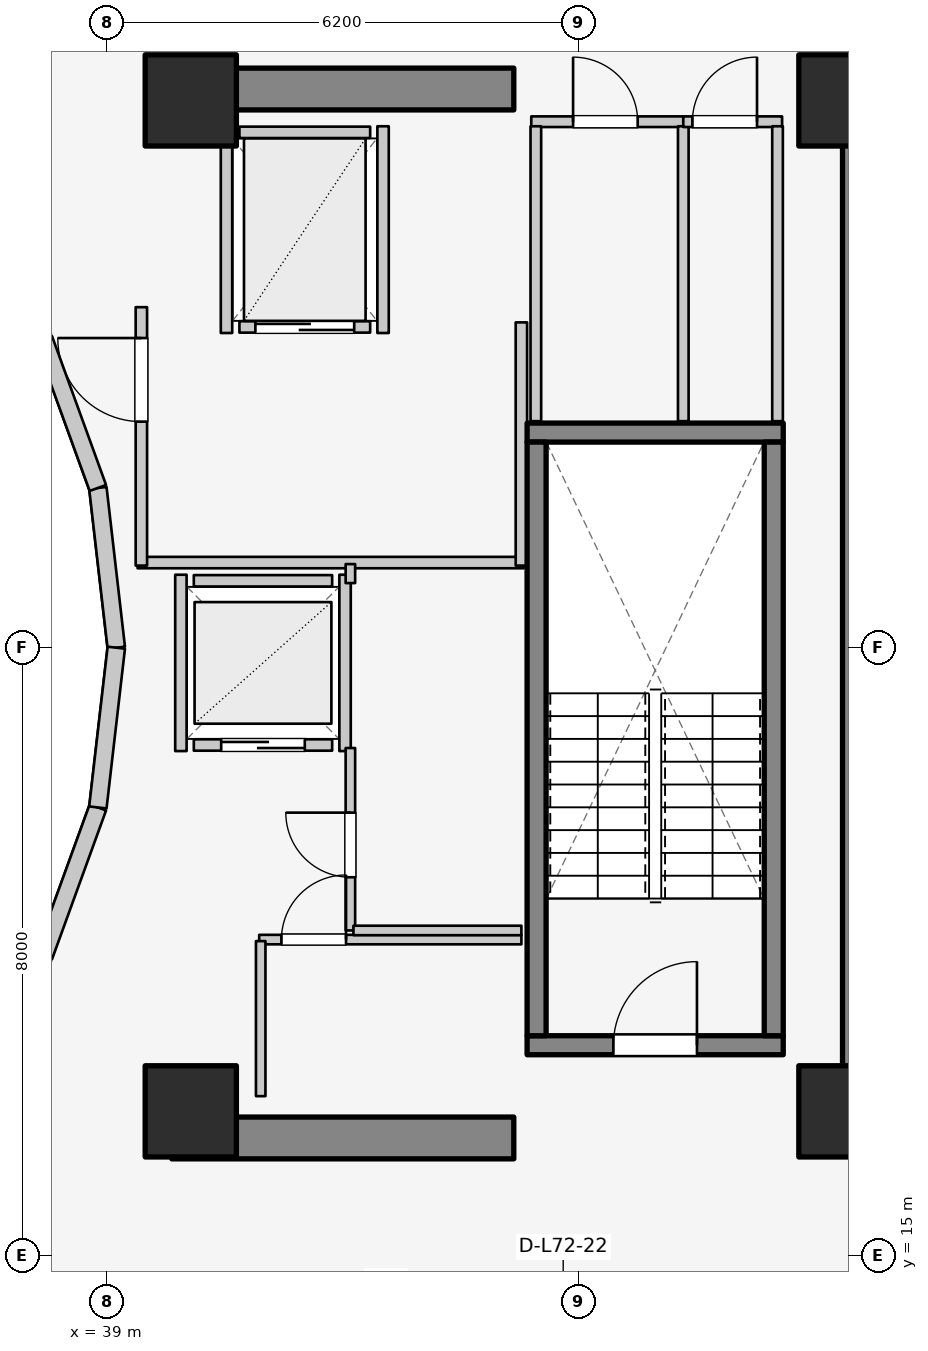
"""IFC4 building model, lengths in metres.
Left out: names, types, materials, properties, quantities, classifications, styles, units other than length and angle.
Written with IfcOpenShell. Run it as: python <this file> out.ifc"""

import sys

from ifc_helpers import new_model, si_unit, direction, frame, frame_2d, origin, origin_2d, place, context, subcontext, project, spatial, rectangle, extrude, element, fill, save


model = new_model("IFC4")
c1 = context("Model", 3, precision=1e-05, world=origin(), true_north=direction((0.0, 1.0)))
c2 = subcontext(c1, "Body", "Model", "MODEL_VIEW")
j1 = project(units=[si_unit("LENGTHUNIT", "METRE"), si_unit("PLANEANGLEUNIT", "RADIAN")], contexts=[c1])
p1 = place(None, origin())
s1 = spatial("IfcSite", under=j1, at=p1, CompositionType="ELEMENT")
p2 = place(p1, origin())
s2 = spatial("IfcBuilding", under=s1, at=p2, CompositionType="ELEMENT")
p3 = place(p2, frame((0.0, 0.0, 235.7)))
s3 = spatial("IfcBuildingStorey", under=s2, at=p3, CompositionType="ELEMENT", Elevation=235.7)
p4 = place(p3, frame((48.95, 17.05, 0.0), z_axis=(0.0, 0.0, 1.0), x_axis=(0.0, 1.0, 0.0)))
e1 = element("IfcWall", 1, at=p4, inside=s3, PredefinedType="SHEAR", context=c2, shape_type="SweptSolid", body=[
    extrude(rectangle(XDim=12.8, YDim=0.55, at=frame_2d((6.4, 0.0))), origin(), (0.0, 0.0, 1.0), 3.1),
])
for number, where, z_axis, x_axis in (
    (2, (39.85, 16.55, 0.0), (0.0, 0.0, 1.0), (1.0, 0.0, 0.0)),
    (3, (39.85, 30.35, 0.0), (0.0, 0.0, 1.0), (1.0, 0.0, 0.0)),
):
    element("IfcWall", number, at=place(p3, frame(where, z_axis=z_axis, x_axis=x_axis)), inside=s3, PredefinedType="SHEAR", context=c2, shape_type="SweptSolid", body=[
        extrude(rectangle(XDim=4.5, YDim=0.55, at=frame_2d((2.25, 0.0))), origin(), (0.0, 0.0, 1.0), 3.1),
    ])
p5 = place(p3, frame((44.525, 17.77, 0.0), z_axis=(0.0, 0.0, 1.0), x_axis=(1.0, 0.0, 0.0)))
e4 = element("IfcWall", 4, at=p5, inside=s3, PredefinedType="SOLIDWALL", context=c2, shape_type="SweptSolid", body=[
    extrude(rectangle(XDim=3.37, YDim=0.25, at=frame_2d((1.685, 0.0))), origin(), (0.0, 0.0, 1.0), 3.1),
])
p6 = place(p5, frame((1.135, 0.0, 0.0)))
e5 = element("IfcOpeningElement", 5, at=p6, cuts=e4, PredefinedType="OPENING", context=c2, shape_type="SweptSolid", body=[
    extrude(rectangle(XDim=1.1, YDim=2.1, at=frame_2d((0.55, 1.05))), frame((0.0, 0.135, 0.0), z_axis=(0.0, -1.0, 0.0), x_axis=(1.0, 0.0, 0.0)), (0.0, 0.0, 1.0), 0.27),
])
p7 = place(p3, frame((44.525, 25.83, 0.0), z_axis=(0.0, 0.0, 1.0), x_axis=(1.0, 0.0, 0.0)))
e6 = element("IfcWall", 6, at=p7, inside=s3, PredefinedType="SOLIDWALL", context=c2, shape_type="SweptSolid", body=[
    extrude(rectangle(XDim=3.37, YDim=0.25, at=frame_2d((1.685, 0.0))), origin(), (0.0, 0.0, 1.0), 3.1),
])
for number, where, z_axis, x_axis in (
    (7, (44.65, 17.895, 0.0), (0.0, 0.0, 1.0), (0.0, 1.0, 0.0)),
    (8, (47.77, 17.895, 0.0), (0.0, 0.0, 1.0), (0.0, 1.0, 0.0)),
):
    element("IfcWall", number, at=place(p3, frame(where, z_axis=z_axis, x_axis=x_axis)), inside=s3, PredefinedType="SOLIDWALL", context=c2, shape_type="SweptSolid", body=[
        extrude(rectangle(XDim=7.81, YDim=0.25, at=frame_2d((3.905, 0.0))), origin(), (0.0, 0.0, 1.0), 3.1),
    ])
for number, where, z_axis, x_axis in (
    (9, (40.1, 16.9, 0.0), (0.0, 0.0, 1.0), (1.0, 0.0, 0.0)),
    (10, (48.7, 16.9, 0.0), (0.0, 0.0, 1.0), (1.0, 0.0, 0.0)),
    (11, (48.7, 30.2, 0.0), (0.0, 0.0, 1.0), (1.0, 0.0, 0.0)),
    (12, (40.1, 30.2, 0.0), (0.0, 0.0, 1.0), (1.0, 0.0, 0.0)),
):
    element("IfcColumn", number, at=place(p3, frame(where, z_axis=z_axis, x_axis=x_axis)), inside=s3, PredefinedType="COLUMN", context=c2, shape_type="SweptSolid", body=[
        extrude(rectangle(XDim=1.2, YDim=1.2, at=origin_2d()), origin(), (0.0, 0.0, 1.0), 3.1),
    ])
p8 = place(p3, frame((39.12, 23.0, 0.0), z_axis=(0.0, 0.0, 1.0), x_axis=(-0.114711713601, 0.993398823617, 0.0)))
e13 = element("IfcWall", 13, at=p8, inside=s3, PredefinedType="STANDARD", context=c2, shape_type="SweptSolid", body=[
    extrude(rectangle(XDim=2.115, YDim=0.23, at=frame_2d((1.058, 0.0))), origin(), (0.0, 0.0, 1.0), 2.56),
])
for number, where, z_axis, x_axis in (
    (14, (38.877, 25.102, 0.0), (0.0, 0.0, 1.0), (-0.341, 0.94, 0.0)),
    (15, (38.166, 18.94, 0.0), (0.0, 0.0, 1.0), (0.341, 0.94, 0.0)),
):
    element("IfcWall", number, at=place(p3, frame(where, z_axis=z_axis, x_axis=x_axis)), inside=s3, PredefinedType="STANDARD", context=c2, shape_type="SweptSolid", body=[
        extrude(rectangle(XDim=2.084, YDim=0.23, at=frame_2d((1.042, 0.0))), origin(), (0.0, 0.0, 1.0), 2.56),
    ])
p9 = place(p3, frame((38.877, 20.898, 0.0), z_axis=(0.0, 0.0, 1.0), x_axis=(0.114711713601, 0.993398823617, 0.0)))
e16 = element("IfcWall", 16, at=p9, inside=s3, PredefinedType="STANDARD", context=c2, shape_type="SweptSolid", body=[
    extrude(rectangle(XDim=2.115, YDim=0.23, at=frame_2d((1.058, 0.0))), origin(), (0.0, 0.0, 1.0), 2.56),
])
p10 = place(p3, frame((40.14, 21.72, 0.0), z_axis=(0.0, 0.0, 1.0), x_axis=(1.0, 0.0, 0.0)))
e17 = element("IfcWall", 17, at=p10, inside=s3, PredefinedType="SOLIDWALL", context=c2, shape_type="SweptSolid", body=[
    extrude(rectangle(XDim=1.82, YDim=0.15, at=frame_2d((0.91, 0.0))), origin(), (0.0, 0.0, 1.0), 2.12),
])
p11 = place(p10, frame((0.36, 0.0, 0.0)))
e18 = element("IfcOpeningElement", 18, at=p11, cuts=e17, PredefinedType="OPENING", context=c2, shape_type="SweptSolid", body=[
    extrude(rectangle(XDim=1.1, YDim=2.1, at=frame_2d((0.55, 1.05))), frame((0.0, 0.085, 0.0), z_axis=(0.0, -1.0, 0.0), x_axis=(1.0, 0.0, 0.0)), (0.0, 0.0, 1.0), 0.17),
])
p12 = place(p3, frame((40.14, 23.88, 0.0), z_axis=(0.0, 0.0, 1.0), x_axis=(1.0, 0.0, 0.0)))
e19 = element("IfcWall", 19, at=p12, inside=s3, PredefinedType="SOLIDWALL", context=c2, shape_type="SweptSolid", body=[
    extrude(rectangle(XDim=1.82, YDim=0.15, at=frame_2d((0.91, 0.0))), origin(), (0.0, 0.0, 1.0), 2.12),
])
p13 = place(p3, frame((39.97, 21.64, 0.0), z_axis=(0.0, 0.0, 1.0), x_axis=(0.0, 1.0, 0.0)))
e20 = element("IfcWall", 20, at=p13, inside=s3, PredefinedType="SOLIDWALL", context=c2, shape_type="SweptSolid", body=[
    extrude(rectangle(XDim=2.32, YDim=0.15, at=frame_2d((1.16, 0.0))), origin(), (0.0, 0.0, 1.0), 2.12),
])
p14 = place(p3, frame((42.13, 21.64, 0.0), z_axis=(0.0, 0.0, 1.0), x_axis=(0.0, 1.0, 0.0)))
e21 = element("IfcWall", 21, at=p14, inside=s3, PredefinedType="SOLIDWALL", context=c2, shape_type="SweptSolid", body=[
    extrude(rectangle(XDim=2.32, YDim=0.15, at=frame_2d((1.16, 0.0))), origin(), (0.0, 0.0, 1.0), 2.575),
])
p15 = place(p3, frame((40.74, 27.22, 0.0), z_axis=(0.0, 0.0, 1.0), x_axis=(1.0, 0.0, 0.0)))
e22 = element("IfcWall", 22, at=p15, inside=s3, PredefinedType="SOLIDWALL", context=c2, shape_type="SweptSolid", body=[
    extrude(rectangle(XDim=1.72, YDim=0.15, at=frame_2d((0.86, 0.0))), origin(), (0.0, 0.0, 1.0), 2.575),
])
p16 = place(p15, frame((0.21, 0.0, 0.0)))
e23 = element("IfcOpeningElement", 23, at=p16, cuts=e22, PredefinedType="OPENING", context=c2, shape_type="SweptSolid", body=[
    extrude(rectangle(XDim=1.3, YDim=2.1, at=frame_2d((0.65, 1.05))), frame((0.0, 0.085, 0.0), z_axis=(0.0, -1.0, 0.0), x_axis=(1.0, 0.0, 0.0)), (0.0, 0.0, 1.0), 0.17),
])
p17 = place(p3, frame((40.74, 29.78, 0.0), z_axis=(0.0, 0.0, 1.0), x_axis=(1.0, 0.0, 0.0)))
e24 = element("IfcWall", 24, at=p17, inside=s3, PredefinedType="SOLIDWALL", context=c2, shape_type="SweptSolid", body=[
    extrude(rectangle(XDim=1.72, YDim=0.15, at=frame_2d((0.86, 0.0))), origin(), (0.0, 0.0, 1.0), 2.575),
])
for number, where, z_axis, x_axis in (
    (25, (40.57, 27.14, 0.0), (0.0, 0.0, 1.0), (0.0, 1.0, 0.0)),
    (26, (42.63, 27.14, 0.0), (0.0, 0.0, 1.0), (0.0, 1.0, 0.0)),
):
    element("IfcWall", number, at=place(p3, frame(where, z_axis=z_axis, x_axis=x_axis)), inside=s3, PredefinedType="SOLIDWALL", context=c2, shape_type="SweptSolid", body=[
        extrude(rectangle(XDim=2.72, YDim=0.15, at=frame_2d((1.36, 0.0))), origin(), (0.0, 0.0, 1.0), 2.575),
    ])
p18 = place(p3, frame((39.4, 24.12, 0.0), z_axis=(0.0, 0.0, 1.0), x_axis=(1.0, 0.0, 0.0)))
e27 = element("IfcWall", 27, at=p18, inside=s3, PredefinedType="PARTITIONING", context=c2, shape_type="SweptSolid", body=[
    extrude(rectangle(XDim=5.08, YDim=0.15, at=frame_2d((2.54, 0.0))), origin(), (0.0, 0.0, 1.0), 2.12),
])
p19 = place(p3, frame((44.45, 24.08, 0.0), z_axis=(0.0, 0.0, 1.0), x_axis=(0.0, 1.0, 0.0)))
e28 = element("IfcWall", 28, at=p19, inside=s3, PredefinedType="PARTITIONING", context=c2, shape_type="SweptSolid", body=[
    extrude(rectangle(XDim=3.2, YDim=0.15, at=frame_2d((1.6, 0.0))), origin(), (0.0, 0.0, 1.0), 2.575),
])
p20 = place(p3, frame((39.45, 24.08, 0.0), z_axis=(0.0, 0.0, 1.0), x_axis=(0.0, 1.0, 0.0)))
e29 = element("IfcWall", 29, at=p20, inside=s3, PredefinedType="PARTITIONING", context=c2, shape_type="SweptSolid", body=[
    extrude(rectangle(XDim=3.4, YDim=0.15, at=frame_2d((1.7, 0.0))), origin(), (0.0, 0.0, 1.0), 2.575),
])
p21 = place(p20, frame((1.894, 0.0, 0.0)))
e30 = element("IfcOpeningElement", 30, at=p21, cuts=e29, PredefinedType="OPENING", context=c2, shape_type="SweptSolid", body=[
    extrude(rectangle(XDim=1.1, YDim=2.1, at=frame_2d((0.55, 1.05))), frame((0.0, 0.085, 0.0), z_axis=(0.0, -1.0, 0.0), x_axis=(1.0, 0.0, 0.0)), (0.0, 0.0, 1.0), 0.17),
])
p22 = place(p3, frame((41.0, 19.16, 0.0), z_axis=(0.0, 0.0, 1.0), x_axis=(1.0, 0.0, 0.0)))
e31 = element("IfcWall", 31, at=p22, inside=s3, PredefinedType="PARTITIONING", context=c2, shape_type="SweptSolid", body=[
    extrude(rectangle(XDim=3.45, YDim=0.125, at=frame_2d((1.725, 0.0))), origin(), (0.0, 0.0, 1.0), 2.12),
])
p23 = place(p22, frame((0.293, 0.0, 0.0)))
e32 = element("IfcOpeningElement", 32, at=p23, cuts=e31, PredefinedType="OPENING", context=c2, shape_type="SweptSolid", body=[
    extrude(rectangle(XDim=0.85, YDim=2.05, at=frame_2d((0.425, 1.025))), frame((0.0, 0.073, 0.0), z_axis=(0.0, -1.0, 0.0), x_axis=(1.0, 0.0, 0.0)), (0.0, 0.0, 1.0), 0.145),
])
p24 = place(p3, frame((41.02, 17.1, 0.0), z_axis=(0.0, 0.0, 1.0), x_axis=(0.0, 1.0, 0.0)))
e33 = element("IfcWall", 33, at=p24, inside=s3, PredefinedType="PARTITIONING", context=c2, shape_type="SweptSolid", body=[
    extrude(rectangle(XDim=2.04, YDim=0.125, at=frame_2d((1.02, 0.0))), origin(), (0.0, 0.0, 1.0), 2.575),
])
p25 = place(p3, frame((42.2, 19.28, 0.0), z_axis=(0.0, 0.0, 1.0), x_axis=(0.0, 1.0, 0.0)))
e34 = element("IfcWall", 34, at=p25, inside=s3, PredefinedType="PARTITIONING", context=c2, shape_type="SweptSolid", body=[
    extrude(rectangle(XDim=2.4, YDim=0.125, at=frame_2d((1.2, 0.0))), origin(), (0.0, 0.0, 1.0), 2.575),
])
p26 = place(p25, frame((0.7, 0.0, 0.0)))
e35 = element("IfcOpeningElement", 35, at=p26, cuts=e34, PredefinedType="OPENING", context=c2, shape_type="SweptSolid", body=[
    extrude(rectangle(XDim=0.85, YDim=2.05, at=frame_2d((0.425, 1.025))), frame((0.0, 0.073, 0.0), z_axis=(0.0, -1.0, 0.0), x_axis=(1.0, 0.0, 0.0)), (0.0, 0.0, 1.0), 0.145),
])
p27 = place(p3, frame((42.2, 23.85, 0.0), z_axis=(0.0, 0.0, 1.0), x_axis=(0.0, 1.0, 0.0)))
e36 = element("IfcWall", 36, at=p27, inside=s3, PredefinedType="PARTITIONING", context=c2, shape_type="SweptSolid", body=[
    extrude(rectangle(XDim=0.25, YDim=0.125, at=frame_2d((0.125, 0.0))), origin(), (0.0, 0.0, 1.0), 2.575),
])
p28 = place(p3, frame((42.24, 19.28, 0.0), z_axis=(0.0, 0.0, 1.0), x_axis=(1.0, 0.0, 0.0)))
e37 = element("IfcWall", 37, at=p28, inside=s3, PredefinedType="PARTITIONING", context=c2, shape_type="SweptSolid", body=[
    extrude(rectangle(XDim=2.21, YDim=0.125, at=frame_2d((1.105, 0.0))), origin(), (0.0, 0.0, 1.0), 2.12),
])
p29 = place(p3, frame((44.58, 29.92, 0.0), z_axis=(0.0, 0.0, 1.0), x_axis=(1.0, 0.0, 0.0)))
e38 = element("IfcWall", 38, at=p29, inside=s3, PredefinedType="PLUMBINGWALL", context=c2, shape_type="SweptSolid", body=[
    extrude(rectangle(XDim=2.0, YDim=0.14, at=frame_2d((1.0, 0.0))), origin(), (0.0, 0.0, 1.0), 2.575),
])
p30 = place(p29, frame((0.55, 0.0, 0.0)))
e39 = element("IfcOpeningElement", 39, at=p30, cuts=e38, PredefinedType="OPENING", context=c2, shape_type="SweptSolid", body=[
    extrude(rectangle(XDim=0.85, YDim=2.05, at=frame_2d((0.425, 1.025))), frame((0.0, 0.08, 0.0), z_axis=(0.0, -1.0, 0.0), x_axis=(1.0, 0.0, 0.0)), (0.0, 0.0, 1.0), 0.16),
])
for number, where, z_axis, x_axis in (
    (40, (44.64, 25.98, 0.0), (0.0, 0.0, 1.0), (0.0, 1.0, 0.0)),
    (41, (46.58, 25.98, 0.0), (0.0, 0.0, 1.0), (0.0, 1.0, 0.0)),
):
    element("IfcWall", number, at=place(p3, frame(where, z_axis=z_axis, x_axis=x_axis)), inside=s3, PredefinedType="PLUMBINGWALL", context=c2, shape_type="SweptSolid", body=[
        extrude(rectangle(XDim=3.88, YDim=0.14, at=frame_2d((1.94, 0.0))), origin(), (0.0, 0.0, 1.0), 2.575),
    ])
p31 = place(p3, frame((46.58, 29.92, 0.0), z_axis=(0.0, 0.0, 1.0), x_axis=(1.0, 0.0, 0.0)))
e42 = element("IfcWall", 42, at=p31, inside=s3, PredefinedType="PLUMBINGWALL", context=c2, shape_type="SweptSolid", body=[
    extrude(rectangle(XDim=1.3, YDim=0.14, at=frame_2d((0.65, 0.0))), origin(), (0.0, 0.0, 1.0), 2.575),
])
p32 = place(p31, frame((0.12, 0.0, 0.0)))
e43 = element("IfcOpeningElement", 43, at=p32, cuts=e42, PredefinedType="OPENING", context=c2, shape_type="SweptSolid", body=[
    extrude(rectangle(XDim=0.85, YDim=2.05, at=frame_2d((0.425, 1.025))), frame((0.0, 0.08, 0.0), z_axis=(0.0, -1.0, 0.0), x_axis=(1.0, 0.0, 0.0)), (0.0, 0.0, 1.0), 0.16),
])
p33 = place(p3, frame((47.82, 25.98, 0.0), z_axis=(0.0, 0.0, 1.0), x_axis=(0.0, 1.0, 0.0)))
e44 = element("IfcWall", 44, at=p33, inside=s3, PredefinedType="PLUMBINGWALL", context=c2, shape_type="SweptSolid", body=[
    extrude(rectangle(XDim=3.88, YDim=0.14, at=frame_2d((1.94, 0.0))), origin(), (0.0, 0.0, 1.0), 2.575),
])
p34 = place(p6, origin())
e45 = element("IfcDoor", 45, at=p34, inside=s3, OperationType="SINGLE_SWING_RIGHT", PredefinedType="DOOR", context=c2, shape_type="SweptSolid", body=[
    extrude(rectangle(XDim=1.1, YDim=2.1, at=frame_2d((0.55, 1.05))), frame((0.0, 0.025, 0.0), z_axis=(0.0, -1.0, 0.0), x_axis=(1.0, 0.0, 0.0)), (0.0, 0.0, 1.0), 0.05),
])
fill(e5, e45)
p35 = place(p11, origin())
e46 = element("IfcDoor", 46, at=p35, inside=s3, OperationType="DOUBLE_DOOR_SLIDING", PredefinedType="DOOR", context=c2, shape_type="SweptSolid", body=[
    extrude(rectangle(XDim=1.1, YDim=2.1, at=frame_2d((0.55, 1.05))), frame((0.0, 0.025, 0.0), z_axis=(0.0, -1.0, 0.0), x_axis=(1.0, 0.0, 0.0)), (0.0, 0.0, 1.0), 0.05),
])
fill(e18, e46)
p36 = place(p16, origin())
e47 = element("IfcDoor", 47, at=p36, inside=s3, OperationType="DOUBLE_DOOR_SLIDING", PredefinedType="DOOR", context=c2, shape_type="SweptSolid", body=[
    extrude(rectangle(XDim=1.3, YDim=2.1, at=frame_2d((0.65, 1.05))), frame((0.0, 0.025, 0.0), z_axis=(0.0, -1.0, 0.0), x_axis=(1.0, 0.0, 0.0)), (0.0, 0.0, 1.0), 0.05),
])
fill(e23, e47)
p37 = place(p21, origin())
e48 = element("IfcDoor", 48, at=p37, inside=s3, OperationType="SINGLE_SWING_RIGHT", PredefinedType="DOOR", context=c2, shape_type="SweptSolid", body=[
    extrude(rectangle(XDim=1.1, YDim=2.1, at=frame_2d((0.55, 1.05))), frame((0.0, 0.025, 0.0), z_axis=(0.0, -1.0, 0.0), x_axis=(1.0, 0.0, 0.0)), (0.0, 0.0, 1.0), 0.05),
])
fill(e30, e48)
p38 = place(p23, origin())
e49 = element("IfcDoor", 49, at=p38, inside=s3, OperationType="SINGLE_SWING_RIGHT", PredefinedType="DOOR", context=c2, shape_type="SweptSolid", body=[
    extrude(rectangle(XDim=0.85, YDim=2.05, at=frame_2d((0.425, 1.025))), frame((0.0, 0.025, 0.0), z_axis=(0.0, -1.0, 0.0), x_axis=(1.0, 0.0, 0.0)), (0.0, 0.0, 1.0), 0.05),
])
fill(e32, e49)
p39 = place(p26, origin())
e50 = element("IfcDoor", 50, at=p39, inside=s3, OperationType="SINGLE_SWING_RIGHT", PredefinedType="DOOR", context=c2, shape_type="SweptSolid", body=[
    extrude(rectangle(XDim=0.85, YDim=2.05, at=frame_2d((0.425, 1.025))), frame((0.0, 0.025, 0.0), z_axis=(0.0, -1.0, 0.0), x_axis=(1.0, 0.0, 0.0)), (0.0, 0.0, 1.0), 0.05),
])
fill(e35, e50)
p40 = place(p30, origin())
e51 = element("IfcDoor", 51, at=p40, inside=s3, OperationType="SINGLE_SWING_LEFT", PredefinedType="DOOR", context=c2, shape_type="SweptSolid", body=[
    extrude(rectangle(XDim=0.85, YDim=2.05, at=frame_2d((0.425, 1.025))), frame((0.0, 0.025, 0.0), z_axis=(0.0, -1.0, 0.0), x_axis=(1.0, 0.0, 0.0)), (0.0, 0.0, 1.0), 0.05),
])
fill(e39, e51)
p41 = place(p32, origin())
e52 = element("IfcDoor", 52, at=p41, inside=s3, OperationType="SINGLE_SWING_RIGHT", PredefinedType="DOOR", context=c2, shape_type="SweptSolid", body=[
    extrude(rectangle(XDim=0.85, YDim=2.05, at=frame_2d((0.425, 1.025))), frame((0.0, 0.025, 0.0), z_axis=(0.0, -1.0, 0.0), x_axis=(1.0, 0.0, 0.0)), (0.0, 0.0, 1.0), 0.05),
])
fill(e43, e52)
save(model, sys.argv[1])
